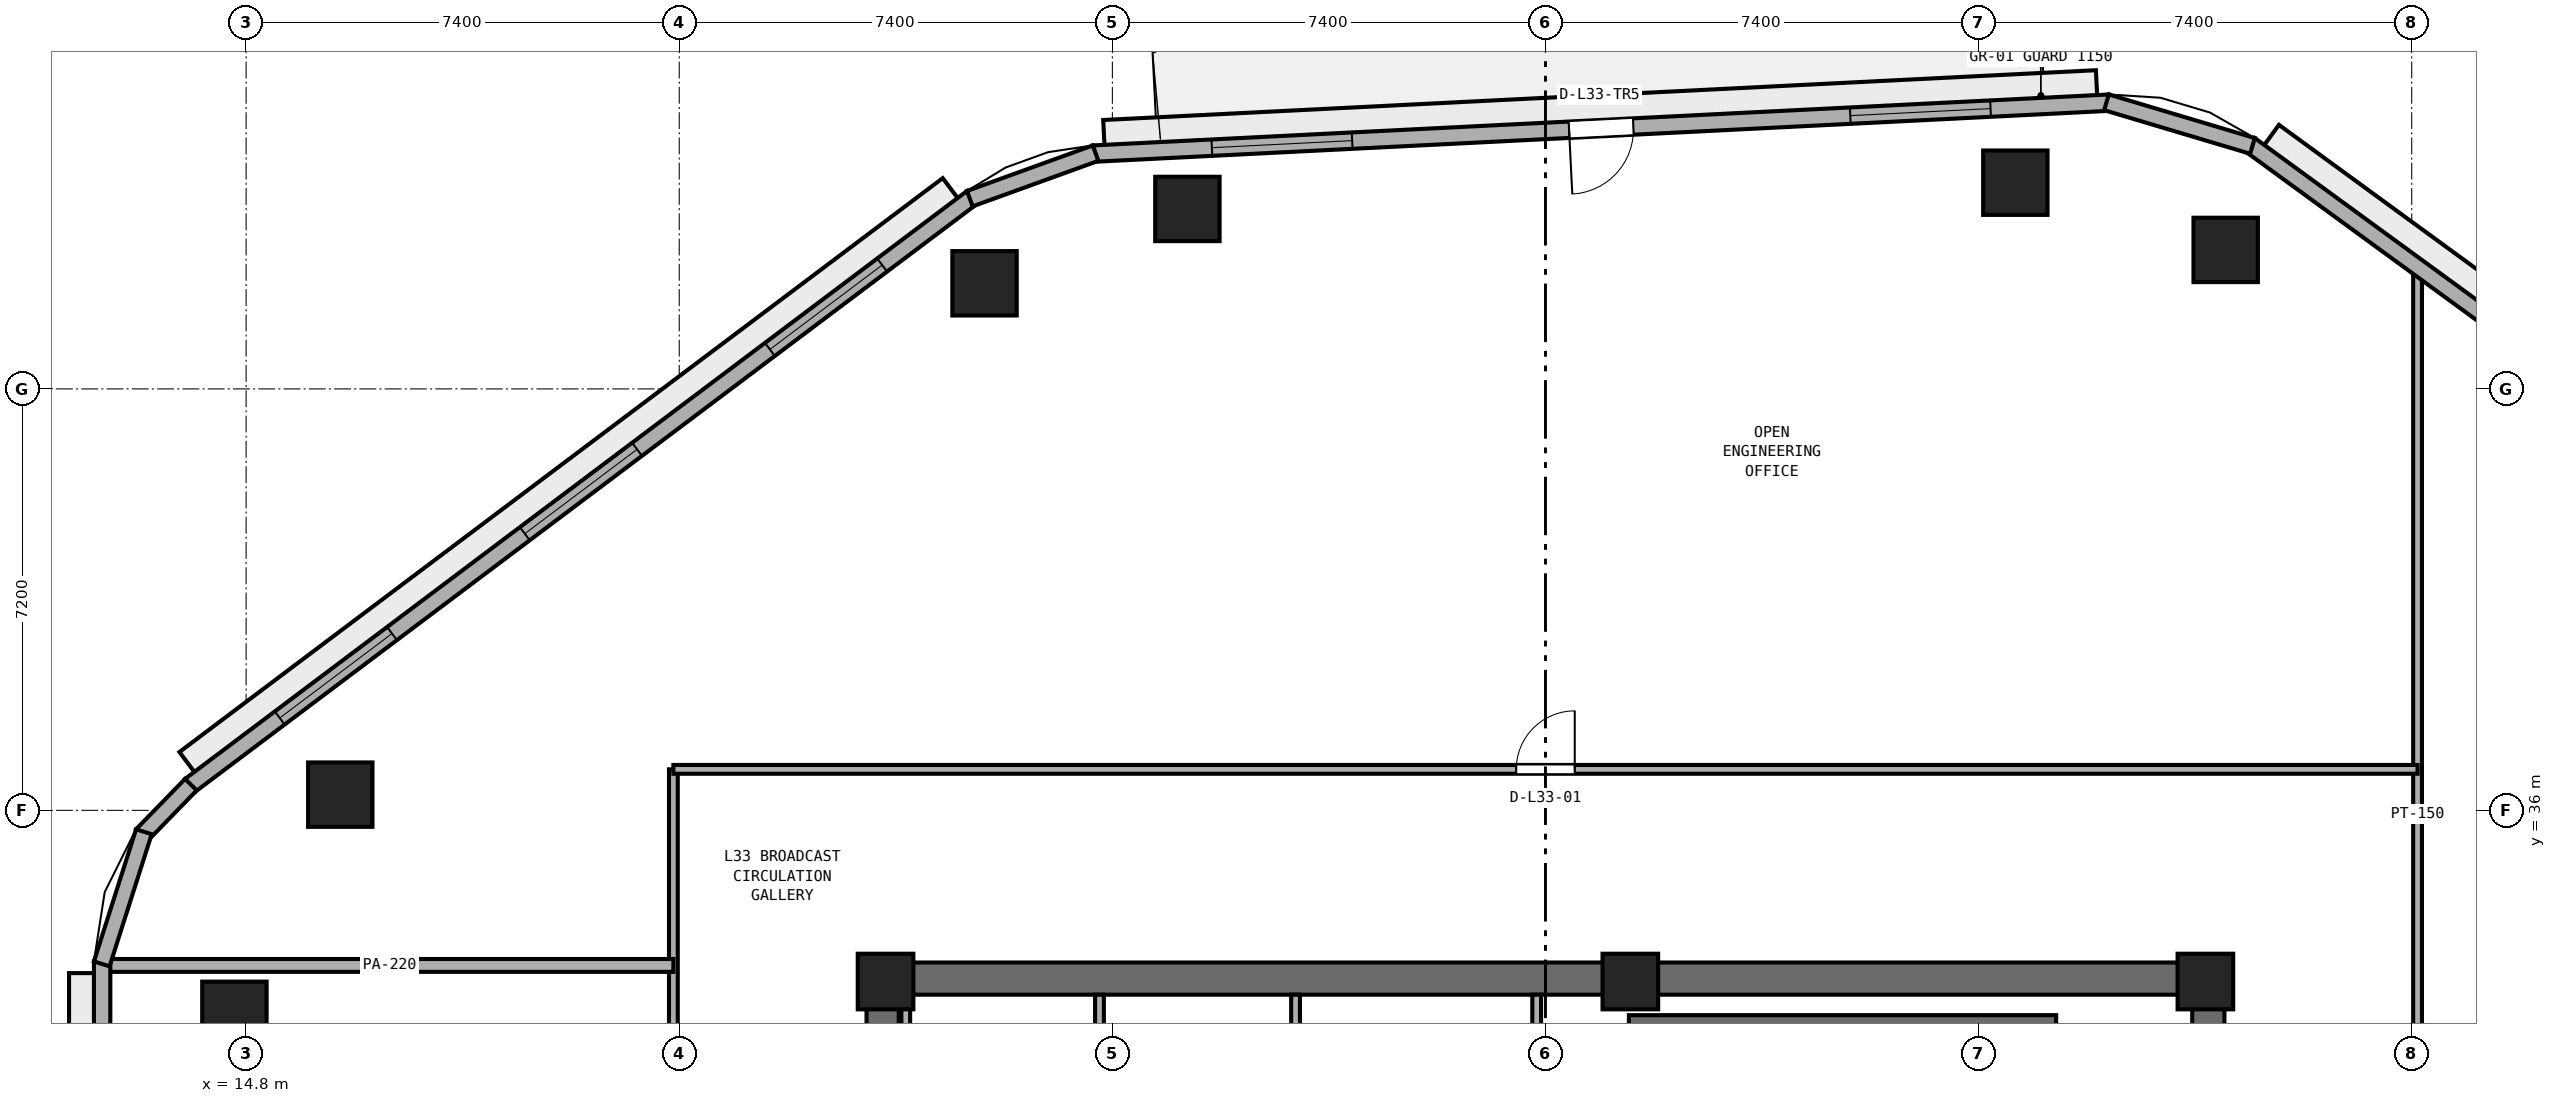
"""IFC4 building model, lengths in metres.
Left out: names, types, materials, properties, quantities, classifications, styles, units other than length and angle.
Written with IfcOpenShell. Run it as: python <this file> out.ifc"""

import sys

from ifc_helpers import new_model, si_unit, direction, frame, frame_2d, origin, origin_2d, place, context, subcontext, project, spatial, rectangle, extrude, element, fill, save


model = new_model("IFC4")
c1 = context("Model", 3, precision=1e-05, world=origin(), true_north=direction((0.0, 1.0)))
c2 = subcontext(c1, "Body", "Model", "MODEL_VIEW")
j1 = project(units=[si_unit("LENGTHUNIT", "METRE"), si_unit("PLANEANGLEUNIT", "RADIAN")], contexts=[c1])
p1 = place(None, origin())
s1 = spatial("IfcSite", under=j1, at=p1, CompositionType="ELEMENT")
p2 = place(p1, origin())
s2 = spatial("IfcBuilding", under=s1, at=p2, CompositionType="ELEMENT")
p3 = place(p2, frame((0.0, 0.0, 132.6)))
s3 = spatial("IfcBuildingStorey", under=s2, at=p3, CompositionType="ELEMENT", Elevation=132.6)
p4 = place(p3, frame((25.4, 33.125, 0.0), z_axis=(0.0, 0.0, 1.0), x_axis=(1.0, 0.0, 0.0)))
e1 = element("IfcWall", 1, at=p4, inside=s3, PredefinedType="SHEAR", context=c2, shape_type="SweptSolid", body=[
    extrude(rectangle(XDim=23.2, YDim=0.55, at=frame_2d((11.6, 0.0))), origin(), (0.0, 0.0, 1.0), 3.54),
])
p5 = place(p3, frame((25.675, 17.55, 0.0), z_axis=(0.0, 0.0, 1.0), x_axis=(0.0, 1.0, 0.0)))
e2 = element("IfcWall", 2, at=p5, inside=s3, PredefinedType="SHEAR", context=c2, shape_type="SweptSolid", body=[
    extrude(rectangle(XDim=15.3, YDim=0.55, at=frame_2d((7.65, 0.0))), origin(), (0.0, 0.0, 1.0), 3.54),
])
p6 = place(p5, frame((6.9, 0.0, 0.0)))
e3 = element("IfcOpeningElement", 3, at=p6, cuts=e2, PredefinedType="OPENING", context=c2, shape_type="SweptSolid", body=[
    extrude(rectangle(XDim=1.5, YDim=2.15, at=frame_2d((0.75, 1.075))), frame((0.0, 0.285, 0.0), z_axis=(0.0, -1.0, 0.0), x_axis=(1.0, 0.0, 0.0)), (0.0, 0.0, 1.0), 0.57),
])
p7 = place(p3, frame((48.325, 17.55, 0.0), z_axis=(0.0, 0.0, 1.0), x_axis=(0.0, 1.0, 0.0)))
e4 = element("IfcWall", 4, at=p7, inside=s3, PredefinedType="SHEAR", context=c2, shape_type="SweptSolid", body=[
    extrude(rectangle(XDim=15.3, YDim=0.55, at=frame_2d((7.65, 0.0))), origin(), (0.0, 0.0, 1.0), 3.54),
])
p8 = place(p7, frame((5.75, 0.0, 0.0)))
e5 = element("IfcOpeningElement", 5, at=p8, cuts=e4, PredefinedType="OPENING", context=c2, shape_type="SweptSolid", body=[
    extrude(rectangle(XDim=1.5, YDim=2.15, at=frame_2d((0.75, 1.075))), frame((0.0, 0.285, 0.0), z_axis=(0.0, -1.0, 0.0), x_axis=(1.0, 0.0, 0.0)), (0.0, 0.0, 1.0), 0.57),
])
for number, where, z_axis, x_axis in (
    (6, (48.275, 33.075, 0.0), (0.0, 0.0, 1.0), (1.0, 0.0, 0.0)),
    (7, (38.45, 33.075, 0.0), (0.0, 0.0, 1.0), (1.0, 0.0, 0.0)),
    (8, (25.725, 33.075, 0.0), (0.0, 0.0, 1.0), (1.0, 0.0, 0.0)),
):
    element("IfcColumn", number, at=place(p3, frame(where, z_axis=z_axis, x_axis=x_axis)), inside=s3, PredefinedType="PILASTER", context=c2, shape_type="SweptSolid", body=[
        extrude(rectangle(XDim=0.95, YDim=0.95, at=origin_2d()), origin(), (0.0, 0.0, 1.0), 3.8),
    ])
for number, where, z_axis, x_axis in (
    (9, (48.622, 45.575, 0.0), (0.0, 0.0, 1.0), (1.0, 0.0, 0.0)),
    (10, (45.028, 46.724, 0.0), (0.0, 0.0, 1.0), (1.0, 0.0, 0.0)),
    (11, (30.882, 46.275, 0.0), (0.0, 0.0, 1.0), (1.0, 0.0, 0.0)),
    (12, (27.416, 45.004, 0.0), (0.0, 0.0, 1.0), (1.0, 0.0, 0.0)),
    (13, (16.409, 36.268, 0.0), (0.0, 0.0, 1.0), (1.0, 0.0, 0.0)),
    (14, (14.6, 32.523, 0.0), (0.0, 0.0, 1.0), (1.0, 0.0, 0.0)),
):
    element("IfcColumn", number, at=place(p3, frame(where, z_axis=z_axis, x_axis=x_axis)), inside=s3, PredefinedType="COLUMN", context=c2, shape_type="SweptSolid", body=[
        extrude(rectangle(XDim=1.1, YDim=1.1, at=origin_2d()), origin(), (0.0, 0.0, 1.0), 3.8),
    ])
p9 = place(p3, frame((38.425, 32.375, 0.0), z_axis=(0.0, 0.0, 1.0), x_axis=(1.0, 0.0, 0.0)))
e15 = element("IfcWall", 15, at=p9, inside=s3, PredefinedType="SHEAR", context=c2, shape_type="SweptSolid", body=[
    extrude(rectangle(XDim=7.3, YDim=0.25, at=frame_2d((3.65, 0.0))), origin(), (0.0, 0.0, 1.0), 3.54),
])
p10 = place(p3, frame((26.07, 30.65, 0.0), z_axis=(0.0, 0.0, 1.0), x_axis=(0.0, 1.0, 0.0)))
e16 = element("IfcWall", 16, at=p10, inside=s3, PredefinedType="PARTITIONING", context=c2, shape_type="SweptSolid", body=[
    extrude(rectangle(XDim=2.2, YDim=0.15, at=frame_2d((1.1, 0.0))), origin(), (0.0, 0.0, 1.0), 2.64),
])
for number, where, z_axis, x_axis in (
    (17, (29.38, 30.65, 0.0), (0.0, 0.0, 1.0), (0.0, 1.0, 0.0)),
    (18, (32.73, 30.65, 0.0), (0.0, 0.0, 1.0), (0.0, 1.0, 0.0)),
    (19, (36.85, 30.65, 0.0), (0.0, 0.0, 1.0), (0.0, 1.0, 0.0)),
):
    element("IfcWall", number, at=place(p3, frame(where, z_axis=z_axis, x_axis=x_axis)), inside=s3, PredefinedType="PARTITIONING", context=c2, shape_type="SweptSolid", body=[
        extrude(rectangle(XDim=2.2, YDim=0.15, at=frame_2d((1.1, 0.0))), origin(), (0.0, 0.0, 1.0), 3.54),
    ])
p11 = place(p3, frame((51.9, 26.55, 0.0), z_axis=(0.0, 0.0, 1.0), x_axis=(0.0, 1.0, 0.0)))
e20 = element("IfcWall", 20, at=p11, inside=s3, PredefinedType="PARTITIONING", context=c2, shape_type="SweptSolid", body=[
    extrude(rectangle(XDim=18.767, YDim=0.15, at=frame_2d((9.384, 0.0))), origin(), (0.0, 0.0, 1.0), 3.54),
])
p12 = place(p3, frame((22.1, 26.55, 0.0), z_axis=(0.0, 0.0, 1.0), x_axis=(0.0, 1.0, 0.0)))
e21 = element("IfcWall", 21, at=p12, inside=s3, PredefinedType="PARTITIONING", context=c2, shape_type="SweptSolid", body=[
    extrude(rectangle(XDim=10.15, YDim=0.15, at=frame_2d((5.075, 0.0))), origin(), (0.0, 0.0, 1.0), 3.54),
])
p13 = place(p12, frame((3.775, 0.0, 0.0)))
e22 = element("IfcOpeningElement", 22, at=p13, cuts=e21, PredefinedType="OPENING", context=c2, shape_type="SweptSolid", body=[
    extrude(rectangle(XDim=0.9, YDim=2.1, at=frame_2d((0.45, 1.05))), frame((0.0, 0.085, 0.0), z_axis=(0.0, -1.0, 0.0), x_axis=(1.0, 0.0, 0.0)), (0.0, 0.0, 1.0), 0.17),
])
p14 = place(p3, frame((12.405, 33.35, 0.0), z_axis=(0.0, 0.0, 1.0), x_axis=(1.0, 0.0, 0.0)))
e23 = element("IfcWall", 23, at=p14, inside=s3, PredefinedType="PARTITIONING", context=c2, shape_type="SweptSolid", body=[
    extrude(rectangle(XDim=9.695, YDim=0.22, at=frame_2d((4.848, 0.0))), origin(), (0.0, 0.0, 1.0), 2.79),
])
p15 = place(p3, frame((22.1, 36.7, 0.0), z_axis=(0.0, 0.0, 1.0), x_axis=(1.0, 0.0, 0.0)))
e24 = element("IfcWall", 24, at=p15, inside=s3, PredefinedType="PARTITIONING", context=c2, shape_type="SweptSolid", body=[
    extrude(rectangle(XDim=29.8, YDim=0.15, at=frame_2d((14.9, 0.0))), origin(), (0.0, 0.0, 1.0), 3.54),
])
p16 = place(p15, frame((14.4, 0.0, 0.0)))
e25 = element("IfcOpeningElement", 25, at=p16, cuts=e24, PredefinedType="OPENING", context=c2, shape_type="SweptSolid", body=[
    extrude(rectangle(XDim=1.0, YDim=2.12, at=frame_2d((0.5, 1.06))), frame((0.0, 0.085, 0.0), z_axis=(0.0, -1.0, 0.0), x_axis=(1.0, 0.0, 0.0)), (0.0, 0.0, 1.0), 0.17),
])
p17 = place(p3, frame((61.516, 38.267, 0.0), z_axis=(0.0, 0.0, 1.0), x_axis=(-0.807812505785, 0.589439526582, 0.0)))
e26 = element("IfcWall", 26, at=p17, inside=s3, PredefinedType="STANDARD", context=c2, shape_type="SweptSolid", body=[
    extrude(rectangle(XDim=15.448, YDim=0.28, at=frame_2d((7.724, 0.0))), origin(), (0.0, 0.0, 1.0), 3.54),
])
p18 = place(p17, frame((1.708, 0.0, 0.9)))
e27 = element("IfcOpeningElement", 27, at=p18, cuts=e26, PredefinedType="OPENING", context=c2, shape_type="SweptSolid", body=[
    extrude(rectangle(XDim=2.4, YDim=1.75, at=frame_2d((1.2, 0.875))), frame((0.0, 0.15, 0.0), z_axis=(0.0, -1.0, 0.0), x_axis=(1.0, 0.0, 0.0)), (0.0, 0.0, 1.0), 0.3),
])
p19 = place(p17, frame((6.524, 0.0, 0.9)))
e28 = element("IfcOpeningElement", 28, at=p19, cuts=e26, PredefinedType="OPENING", context=c2, shape_type="SweptSolid", body=[
    extrude(rectangle(XDim=2.4, YDim=1.75, at=frame_2d((1.2, 0.875))), frame((0.0, 0.15, 0.0), z_axis=(0.0, -1.0, 0.0), x_axis=(1.0, 0.0, 0.0)), (0.0, 0.0, 1.0), 0.3),
])
p20 = place(p3, frame((46.632, 48.091, 0.0), z_axis=(0.0, 0.0, 1.0), x_axis=(-0.998744129094, -0.050101542886, 0.0)))
e29 = element("IfcWall", 29, at=p20, inside=s3, PredefinedType="STANDARD", context=c2, shape_type="SweptSolid", body=[
    extrude(rectangle(XDim=17.382, YDim=0.28, at=frame_2d((8.691, 0.0))), origin(), (0.0, 0.0, 1.0), 3.54),
])
p21 = place(p20, frame((8.141, 0.0, 0.0)))
e30 = element("IfcOpeningElement", 30, at=p21, cuts=e29, PredefinedType="OPENING", context=c2, shape_type="SweptSolid", body=[
    extrude(rectangle(XDim=1.1, YDim=2.2, at=frame_2d((0.55, 1.1))), frame((0.0, 0.15, 0.0), z_axis=(0.0, -1.0, 0.0), x_axis=(1.0, 0.0, 0.0)), (0.0, 0.0, 1.0), 0.3),
])
p22 = place(p20, frame((2.03, 0.0, 0.9)))
e31 = element("IfcOpeningElement", 31, at=p22, cuts=e29, PredefinedType="OPENING", context=c2, shape_type="SweptSolid", body=[
    extrude(rectangle(XDim=2.4, YDim=1.75, at=frame_2d((1.2, 0.875))), frame((0.0, 0.15, 0.0), z_axis=(0.0, -1.0, 0.0), x_axis=(1.0, 0.0, 0.0)), (0.0, 0.0, 1.0), 0.3),
])
p23 = place(p20, frame((12.951, 0.0, 0.9)))
e32 = element("IfcOpeningElement", 32, at=p23, cuts=e29, PredefinedType="OPENING", context=c2, shape_type="SweptSolid", body=[
    extrude(rectangle(XDim=2.4, YDim=1.75, at=frame_2d((1.2, 0.875))), frame((0.0, 0.15, 0.0), z_axis=(0.0, -1.0, 0.0), x_axis=(1.0, 0.0, 0.0)), (0.0, 0.0, 1.0), 0.3),
])
p24 = place(p3, frame((27.201, 46.47, 0.0), z_axis=(0.0, 0.0, 1.0), x_axis=(-0.799280853427, -0.600957666849, 0.0)))
e33 = element("IfcWall", 33, at=p24, inside=s3, PredefinedType="STANDARD", context=c2, shape_type="SweptSolid", body=[
    extrude(rectangle(XDim=16.716, YDim=0.28, at=frame_2d((8.358, 0.0))), origin(), (0.0, 0.0, 1.0), 3.54),
])
p25 = place(p24, frame((1.919, 0.0, 0.9)))
e34 = element("IfcOpeningElement", 34, at=p25, cuts=e33, PredefinedType="OPENING", context=c2, shape_type="SweptSolid", body=[
    extrude(rectangle(XDim=2.4, YDim=1.75, at=frame_2d((1.2, 0.875))), frame((0.0, 0.15, 0.0), z_axis=(0.0, -1.0, 0.0), x_axis=(1.0, 0.0, 0.0)), (0.0, 0.0, 1.0), 0.3),
])
p26 = place(p24, frame((7.158, 0.0, 0.9)))
e35 = element("IfcOpeningElement", 35, at=p26, cuts=e33, PredefinedType="OPENING", context=c2, shape_type="SweptSolid", body=[
    extrude(rectangle(XDim=2.4, YDim=1.75, at=frame_2d((1.2, 0.875))), frame((0.0, 0.15, 0.0), z_axis=(0.0, -1.0, 0.0), x_axis=(1.0, 0.0, 0.0)), (0.0, 0.0, 1.0), 0.3),
])
p27 = place(p24, frame((12.397, 0.0, 0.9)))
e36 = element("IfcOpeningElement", 36, at=p27, cuts=e33, PredefinedType="OPENING", context=c2, shape_type="SweptSolid", body=[
    extrude(rectangle(XDim=2.4, YDim=1.75, at=frame_2d((1.2, 0.875))), frame((0.0, 0.15, 0.0), z_axis=(0.0, -1.0, 0.0), x_axis=(1.0, 0.0, 0.0)), (0.0, 0.0, 1.0), 0.3),
])
p28 = place(p3, frame((12.34, 33.419, 0.0), z_axis=(0.0, 0.0, 1.0), x_axis=(0.0, -1.0, 0.0)))
e37 = element("IfcWall", 37, at=p28, inside=s3, PredefinedType="STANDARD", context=c2, shape_type="SweptSolid", body=[
    extrude(rectangle(XDim=17.232, YDim=0.28, at=frame_2d((8.616, 0.0))), origin(), (0.0, 0.0, 1.0), 3.54),
])
p29 = place(p28, frame((8.066, 0.0, 0.0)))
e38 = element("IfcOpeningElement", 38, at=p29, cuts=e37, PredefinedType="OPENING", context=c2, shape_type="SweptSolid", body=[
    extrude(rectangle(XDim=1.1, YDim=2.2, at=frame_2d((0.55, 1.1))), frame((0.0, 0.15, 0.0), z_axis=(0.0, -1.0, 0.0), x_axis=(1.0, 0.0, 0.0)), (0.0, 0.0, 1.0), 0.3),
])
p30 = place(p28, frame((2.005, 0.0, 0.9)))
e39 = element("IfcOpeningElement", 39, at=p30, cuts=e37, PredefinedType="OPENING", context=c2, shape_type="SweptSolid", body=[
    extrude(rectangle(XDim=2.4, YDim=1.75, at=frame_2d((1.2, 0.875))), frame((0.0, 0.15, 0.0), z_axis=(0.0, -1.0, 0.0), x_axis=(1.0, 0.0, 0.0)), (0.0, 0.0, 1.0), 0.3),
])
p31 = place(p28, frame((12.827, 0.0, 0.9)))
e40 = element("IfcOpeningElement", 40, at=p31, cuts=e37, PredefinedType="OPENING", context=c2, shape_type="SweptSolid", body=[
    extrude(rectangle(XDim=2.4, YDim=1.75, at=frame_2d((1.2, 0.875))), frame((0.0, 0.15, 0.0), z_axis=(0.0, -1.0, 0.0), x_axis=(1.0, 0.0, 0.0)), (0.0, 0.0, 1.0), 0.3),
])
p32 = place(p3, frame((49.079, 47.352, 0.0), z_axis=(0.0, 0.0, 1.0), x_axis=(-0.958207501709, 0.286074087726, 0.0)))
e41 = element("IfcWall", 41, at=p32, inside=s3, PredefinedType="STANDARD", context=c2, shape_type="SweptSolid", body=[
    extrude(rectangle(XDim=2.603, YDim=0.28, at=frame_2d((1.302, 0.0))), origin(), (0.0, 0.0, 1.0), 3.54),
])
p33 = place(p3, frame((29.313, 47.228, 0.0), z_axis=(0.0, 0.0, 1.0), x_axis=(-0.940226330758, -0.340550212084, 0.0)))
e42 = element("IfcWall", 42, at=p33, inside=s3, PredefinedType="STANDARD", context=c2, shape_type="SweptSolid", body=[
    extrude(rectangle(XDim=2.285, YDim=0.28, at=frame_2d((1.142, 0.0))), origin(), (0.0, 0.0, 1.0), 3.54),
])
p34 = place(p3, frame((13.856, 36.438, 0.0), z_axis=(0.0, 0.0, 1.0), x_axis=(-0.697369094044, -0.716712178404, 0.0)))
e43 = element("IfcWall", 43, at=p34, inside=s3, PredefinedType="STANDARD", context=c2, shape_type="SweptSolid", body=[
    extrude(rectangle(XDim=1.199, YDim=0.28, at=frame_2d((0.6, 0.0))), origin(), (0.0, 0.0, 1.0), 3.54),
])
p35 = place(p3, frame((13.053, 35.634, 0.0), z_axis=(0.0, 0.0, 1.0), x_axis=(-0.303807416298, -0.952733464198, 0.0)))
e44 = element("IfcWall", 44, at=p35, inside=s3, PredefinedType="STANDARD", context=c2, shape_type="SweptSolid", body=[
    extrude(rectangle(XDim=2.37, YDim=0.28, at=frame_2d((1.185, 0.0))), origin(), (0.0, 0.0, 1.0), 3.54),
])
p36 = place(p16, origin())
e45 = element("IfcDoor", 45, at=p36, inside=s3, OperationType="SINGLE_SWING_RIGHT", PredefinedType="DOOR", context=c2, shape_type="SweptSolid", body=[
    extrude(rectangle(XDim=1.0, YDim=2.12, at=frame_2d((0.5, 1.06))), frame((0.0, 0.025, 0.0), z_axis=(0.0, -1.0, 0.0), x_axis=(1.0, 0.0, 0.0)), (0.0, 0.0, 1.0), 0.05),
])
fill(e25, e45)
p37 = place(p21, origin())
e46 = element("IfcDoor", 46, at=p37, inside=s3, OperationType="SINGLE_SWING_RIGHT", PredefinedType="DOOR", context=c2, shape_type="SweptSolid", body=[
    extrude(rectangle(XDim=1.1, YDim=2.2, at=frame_2d((0.55, 1.1))), frame((0.0, 0.025, 0.0), z_axis=(0.0, -1.0, 0.0), x_axis=(1.0, 0.0, 0.0)), (0.0, 0.0, 1.0), 0.05),
])
fill(e30, e46)
p38 = place(p22, origin())
e47 = element("IfcWindow", 47, at=p38, inside=s3, PartitioningType="SINGLE_PANEL", PredefinedType="WINDOW", context=c2, shape_type="SweptSolid", body=[
    extrude(rectangle(XDim=2.4, YDim=1.75, at=frame_2d((1.2, 0.875))), frame((0.0, 0.03, 0.0), z_axis=(0.0, -1.0, 0.0), x_axis=(1.0, 0.0, 0.0)), (0.0, 0.0, 1.0), 0.06),
])
fill(e31, e47)
p39 = place(p23, origin())
e48 = element("IfcWindow", 48, at=p39, inside=s3, PartitioningType="SINGLE_PANEL", PredefinedType="WINDOW", context=c2, shape_type="SweptSolid", body=[
    extrude(rectangle(XDim=2.4, YDim=1.75, at=frame_2d((1.2, 0.875))), frame((0.0, 0.03, 0.0), z_axis=(0.0, -1.0, 0.0), x_axis=(1.0, 0.0, 0.0)), (0.0, 0.0, 1.0), 0.06),
])
fill(e32, e48)
p40 = place(p25, origin())
e49 = element("IfcWindow", 49, at=p40, inside=s3, PartitioningType="SINGLE_PANEL", PredefinedType="WINDOW", context=c2, shape_type="SweptSolid", body=[
    extrude(rectangle(XDim=2.4, YDim=1.75, at=frame_2d((1.2, 0.875))), frame((0.0, 0.03, 0.0), z_axis=(0.0, -1.0, 0.0), x_axis=(1.0, 0.0, 0.0)), (0.0, 0.0, 1.0), 0.06),
])
fill(e34, e49)
p41 = place(p26, origin())
e50 = element("IfcWindow", 50, at=p41, inside=s3, PartitioningType="SINGLE_PANEL", PredefinedType="WINDOW", context=c2, shape_type="SweptSolid", body=[
    extrude(rectangle(XDim=2.4, YDim=1.75, at=frame_2d((1.2, 0.875))), frame((0.0, 0.03, 0.0), z_axis=(0.0, -1.0, 0.0), x_axis=(1.0, 0.0, 0.0)), (0.0, 0.0, 1.0), 0.06),
])
fill(e35, e50)
p42 = place(p27, origin())
e51 = element("IfcWindow", 51, at=p42, inside=s3, PartitioningType="SINGLE_PANEL", PredefinedType="WINDOW", context=c2, shape_type="SweptSolid", body=[
    extrude(rectangle(XDim=2.4, YDim=1.75, at=frame_2d((1.2, 0.875))), frame((0.0, 0.03, 0.0), z_axis=(0.0, -1.0, 0.0), x_axis=(1.0, 0.0, 0.0)), (0.0, 0.0, 1.0), 0.06),
])
fill(e36, e51)
save(model, sys.argv[1])
